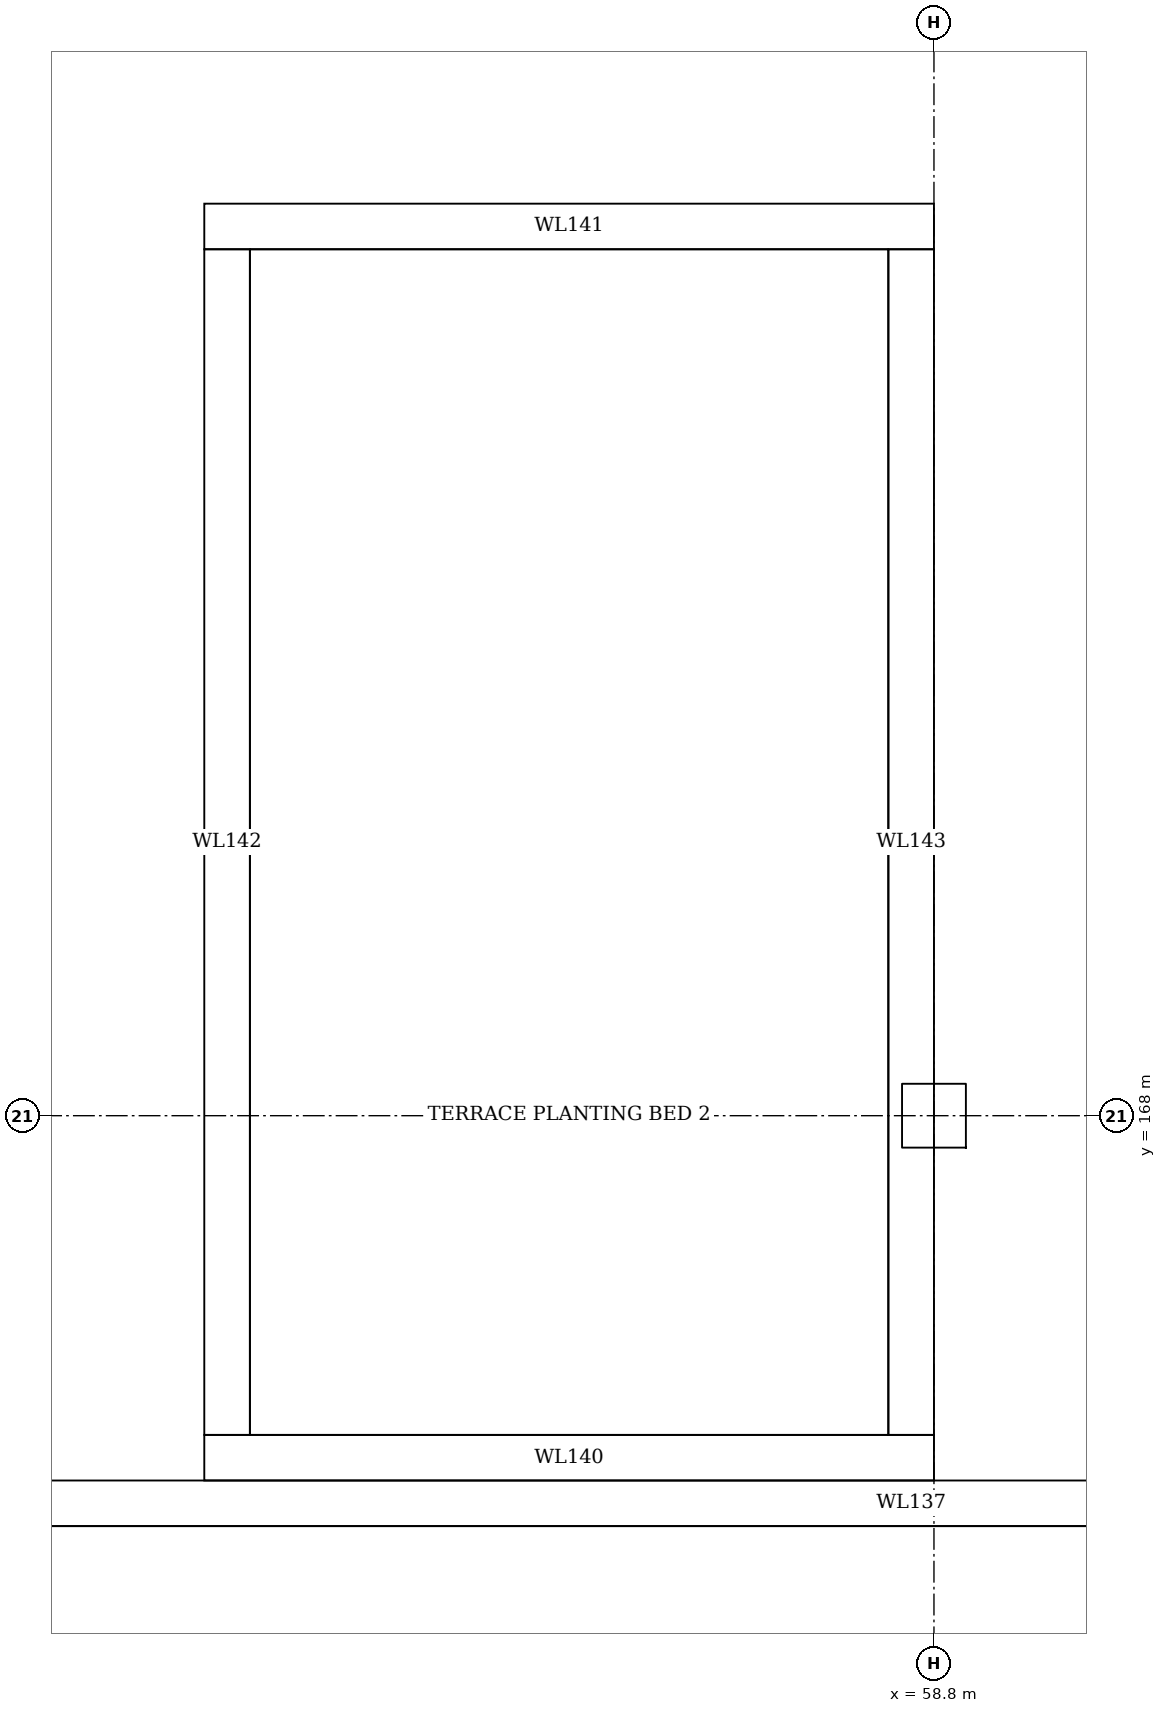
"""IFC4 building model, lengths in metres.
Left out: names, types, materials, properties, quantities, classifications, styles, units other than length and angle.
Written with IfcOpenShell. Run it as: python <this file> out.ifc"""

import sys

from ifc_helpers import new_model, si_unit, direction, frame, frame_2d, origin, place, context, subcontext, project, spatial, rectangle, extrude, element, save


model = new_model("IFC4")
c1 = context("Model", 3, precision=1e-05, world=origin(), true_north=direction((0.0, 1.0)))
c2 = subcontext(c1, "Body", "Model", "MODEL_VIEW")
j1 = project(units=[si_unit("LENGTHUNIT", "METRE"), si_unit("PLANEANGLEUNIT", "RADIAN")], contexts=[c1])
p1 = place(None, origin())
s1 = spatial("IfcSite", under=j1, at=p1, CompositionType="ELEMENT")
p2 = place(p1, origin())
s2 = spatial("IfcBuilding", under=s1, at=p2, CompositionType="ELEMENT")
p3 = place(p2, frame((0.0, 0.0, 17.1)))
s3 = spatial("IfcBuildingStorey", under=s2, at=p3, CompositionType="ELEMENT", Elevation=17.1)
p4 = place(p3, frame((50.4, 165.45, 0.0), z_axis=(0.0, 0.0, 1.0), x_axis=(1.0, 0.0, 0.0)))
e1 = element("IfcWall", 1, at=p4, inside=s3, PredefinedType="SOLIDWALL", context=c2, shape_type="SweptSolid", body=[
    extrude(rectangle(XDim=16.5, YDim=0.3, at=frame_2d((8.25, 0.0))), origin(), (0.0, 0.0, 1.0), 0.6),
])
for number, where, z_axis, x_axis in (
    (2, (54.0, 165.75, 0.0), (0.0, 0.0, 1.0), (1.0, 0.0, 0.0)),
    (3, (54.0, 173.85, 0.0), (0.0, 0.0, 1.0), (1.0, 0.0, 0.0)),
):
    element("IfcWall", number, at=place(p3, frame(where, z_axis=z_axis, x_axis=x_axis)), inside=s3, PredefinedType="SOLIDWALL", context=c2, shape_type="SweptSolid", body=[
        extrude(rectangle(XDim=4.8, YDim=0.3, at=frame_2d((2.4, 0.0))), origin(), (0.0, 0.0, 1.0), 0.6),
    ])
for number, where, z_axis, x_axis in (
    (4, (54.15, 165.9, 0.0), (0.0, 0.0, 1.0), (0.0, 1.0, 0.0)),
    (5, (58.65, 165.9, 0.0), (0.0, 0.0, 1.0), (0.0, 1.0, 0.0)),
):
    element("IfcWall", number, at=place(p3, frame(where, z_axis=z_axis, x_axis=x_axis)), inside=s3, PredefinedType="SOLIDWALL", context=c2, shape_type="SweptSolid", body=[
        extrude(rectangle(XDim=7.8, YDim=0.3, at=frame_2d((3.9, 0.0))), origin(), (0.0, 0.0, 1.0), 0.6),
    ])
save(model, sys.argv[1])
